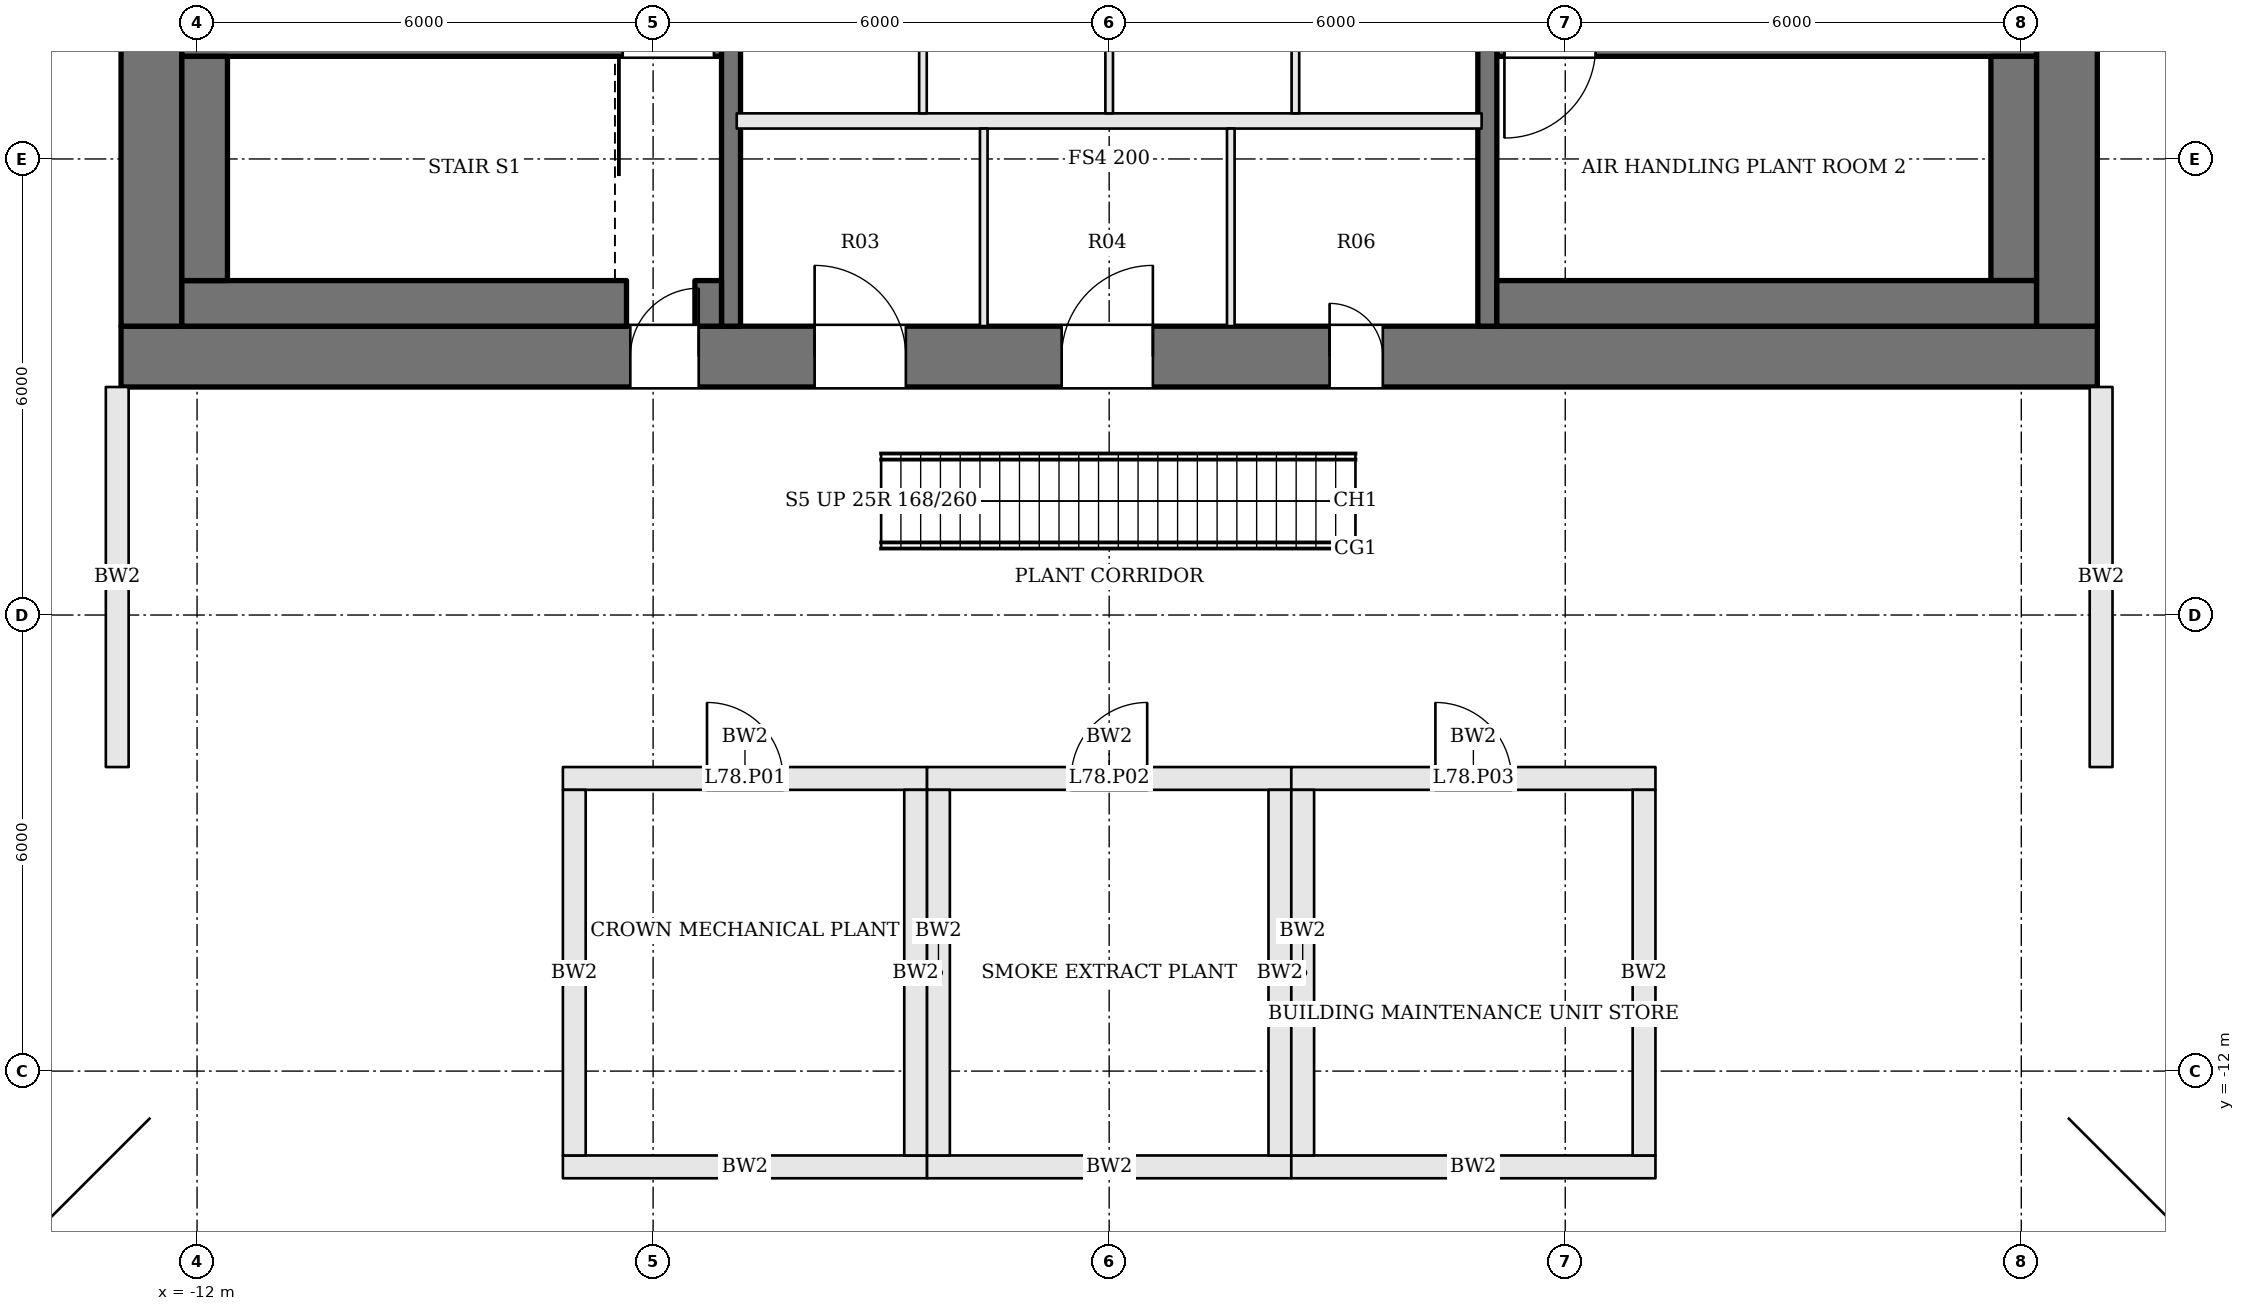
"""IFC4 building model, lengths in metres.
Left out: names, types, materials, properties, quantities, classifications, styles, units other than length and angle.
Written with IfcOpenShell. Run it as: python <this file> out.ifc"""

import sys

from ifc_helpers import new_model, si_unit, direction, frame, frame_2d, origin, place, context, subcontext, project, spatial, rectangle, extrude, element, fill, save


model = new_model("IFC4")
c1 = context("Model", 3, precision=1e-05, world=origin(), true_north=direction((0.0, 1.0)))
c2 = subcontext(c1, "Body", "Model", "MODEL_VIEW")
j1 = project(units=[si_unit("LENGTHUNIT", "METRE"), si_unit("PLANEANGLEUNIT", "RADIAN")], contexts=[c1])
p1 = place(None, origin())
s1 = spatial("IfcSite", under=j1, at=p1, CompositionType="ELEMENT")
p2 = place(p1, origin())
s2 = spatial("IfcBuilding", under=s1, at=p2, CompositionType="ELEMENT")
p3 = place(p2, frame((0.0, 0.0, 316.2)))
s3 = spatial("IfcBuildingStorey", under=s2, at=p3, CompositionType="ELEMENT", Elevation=316.2)
p4 = place(p3, frame((-13.0, -2.6, 0.0), z_axis=(0.0, 0.0, 1.0), x_axis=(1.0, 0.0, 0.0)))
e1 = element("IfcWall", 1, at=p4, inside=s3, PredefinedType="SHEAR", context=c2, shape_type="SweptSolid", body=[
    extrude(rectangle(XDim=26.0, YDim=0.8, at=frame_2d((13.0, 0.0))), origin(), (0.0, 0.0, 1.0), 4.0),
])
p5 = place(p4, frame((9.125, 0.0, 0.0)))
e2 = element("IfcOpeningElement", 2, at=p5, cuts=e1, PredefinedType="OPENING", context=c2, shape_type="SweptSolid", body=[
    extrude(rectangle(XDim=1.2, YDim=2.1, at=frame_2d((0.6, 1.05))), frame((0.0, 0.41, 0.0), z_axis=(0.0, -1.0, 0.0), x_axis=(1.0, 0.0, 0.0)), (0.0, 0.0, 1.0), 0.82),
])
p6 = place(p4, frame((12.375, 0.0, 0.0)))
e3 = element("IfcOpeningElement", 3, at=p6, cuts=e1, PredefinedType="OPENING", context=c2, shape_type="SweptSolid", body=[
    extrude(rectangle(XDim=1.2, YDim=2.1, at=frame_2d((0.6, 1.05))), frame((0.0, 0.41, 0.0), z_axis=(0.0, -1.0, 0.0), x_axis=(1.0, 0.0, 0.0)), (0.0, 0.0, 1.0), 0.82),
])
p7 = place(p4, frame((15.9, 0.0, 0.0)))
e4 = element("IfcOpeningElement", 4, at=p7, cuts=e1, PredefinedType="OPENING", context=c2, shape_type="SweptSolid", body=[
    extrude(rectangle(XDim=0.7, YDim=2.1, at=frame_2d((0.35, 1.05))), frame((0.0, 0.41, 0.0), z_axis=(0.0, -1.0, 0.0), x_axis=(1.0, 0.0, 0.0)), (0.0, 0.0, 1.0), 0.82),
])
p8 = place(p4, frame((6.7, 0.0, 0.0)))
e5 = element("IfcOpeningElement", 5, at=p8, cuts=e1, PredefinedType="OPENING", context=c2, shape_type="SweptSolid", body=[
    extrude(rectangle(XDim=0.9, YDim=2.1, at=frame_2d((0.45, 1.05))), frame((0.0, 0.41, 0.0), z_axis=(0.0, -1.0, 0.0), x_axis=(1.0, 0.0, 0.0)), (0.0, 0.0, 1.0), 0.82),
])
p9 = place(p3, frame((12.6, -2.2, 0.0), z_axis=(0.0, 0.0, 1.0), x_axis=(0.0, 1.0, 0.0)))
e6 = element("IfcWall", 6, at=p9, inside=s3, PredefinedType="SHEAR", context=c2, shape_type="SweptSolid", body=[
    extrude(rectangle(XDim=13.4, YDim=0.8, at=frame_2d((6.7, 0.0))), origin(), (0.0, 0.0, 1.0), 4.0),
])
p10 = place(p9, frame((7.4, 0.0, 0.0)))
e7 = element("IfcOpeningElement", 7, at=p10, cuts=e6, PredefinedType="OPENING", context=c2, shape_type="SweptSolid", body=[
    extrude(rectangle(XDim=1.8, YDim=2.1, at=frame_2d((0.9, 1.05))), frame((0.0, 0.41, 0.0), z_axis=(0.0, -1.0, 0.0), x_axis=(1.0, 0.0, 0.0)), (0.0, 0.0, 1.0), 0.82),
])
p11 = place(p3, frame((-12.6, -2.2, 0.0), z_axis=(0.0, 0.0, 1.0), x_axis=(0.0, 1.0, 0.0)))
e8 = element("IfcWall", 8, at=p11, inside=s3, PredefinedType="SHEAR", context=c2, shape_type="SweptSolid", body=[
    extrude(rectangle(XDim=13.4, YDim=0.8, at=frame_2d((6.7, 0.0))), origin(), (0.0, 0.0, 1.0), 4.0),
])
p12 = place(p11, frame((4.2, 0.0, 0.0)))
e9 = element("IfcOpeningElement", 9, at=p12, cuts=e8, PredefinedType="OPENING", context=c2, shape_type="SweptSolid", body=[
    extrude(rectangle(XDim=1.8, YDim=2.1, at=frame_2d((0.9, 1.05))), frame((0.0, 0.41, 0.0), z_axis=(0.0, -1.0, 0.0), x_axis=(1.0, 0.0, 0.0)), (0.0, 0.0, 1.0), 0.82),
])
p13 = place(p3, frame((-12.2, 1.475, 0.0), z_axis=(0.0, 0.0, 1.0), x_axis=(1.0, 0.0, 0.0)))
e10 = element("IfcWall", 10, at=p13, inside=s3, PredefinedType="SOLIDWALL", context=c2, shape_type="SweptSolid", body=[
    extrude(rectangle(XDim=7.1, YDim=0.25, at=frame_2d((3.55, 0.0))), origin(), (0.0, 0.0, 1.0), 3.28),
])
p14 = place(p13, frame((5.8, 0.0, 0.0)))
e11 = element("IfcOpeningElement", 11, at=p14, cuts=e10, PredefinedType="OPENING", context=c2, shape_type="SweptSolid", body=[
    extrude(rectangle(XDim=1.2, YDim=2.1, at=frame_2d((0.6, 1.05))), frame((0.0, 0.135, 0.0), z_axis=(0.0, -1.0, 0.0), x_axis=(1.0, 0.0, 0.0)), (0.0, 0.0, 1.0), 0.27),
])
p15 = place(p3, frame((12.2, 1.475, 0.0), z_axis=(0.0, 0.0, 1.0), x_axis=(-1.0, 0.0, 0.0)))
e12 = element("IfcWall", 12, at=p15, inside=s3, PredefinedType="SOLIDWALL", context=c2, shape_type="SweptSolid", body=[
    extrude(rectangle(XDim=7.1, YDim=0.25, at=frame_2d((3.55, 0.0))), origin(), (0.0, 0.0, 1.0), 3.28),
])
p16 = place(p15, frame((5.8, 0.0, 0.0)))
e13 = element("IfcOpeningElement", 13, at=p16, cuts=e12, PredefinedType="OPENING", context=c2, shape_type="SweptSolid", body=[
    extrude(rectangle(XDim=1.2, YDim=2.1, at=frame_2d((0.6, 1.05))), frame((0.0, 0.135, 0.0), z_axis=(0.0, -1.0, 0.0), x_axis=(1.0, 0.0, 0.0)), (0.0, 0.0, 1.0), 0.27),
])
p17 = place(p3, frame((-4.975, -2.2, 0.0), z_axis=(0.0, 0.0, 1.0), x_axis=(0.0, 1.0, 0.0)))
e14 = element("IfcWall", 14, at=p17, inside=s3, PredefinedType="SOLIDWALL", context=c2, shape_type="SweptSolid", body=[
    extrude(rectangle(XDim=13.4, YDim=0.25, at=frame_2d((6.7, 0.0))), origin(), (0.0, 0.0, 1.0), 3.28),
])
p18 = place(p17, frame((5.25, 0.0, 0.0)))
e15 = element("IfcOpeningElement", 15, at=p18, cuts=e14, PredefinedType="OPENING", context=c2, shape_type="SweptSolid", body=[
    extrude(rectangle(XDim=1.2, YDim=2.1, at=frame_2d((0.6, 1.05))), frame((0.0, 0.135, 0.0), z_axis=(0.0, -1.0, 0.0), x_axis=(1.0, 0.0, 0.0)), (0.0, 0.0, 1.0), 0.27),
])
p19 = place(p3, frame((4.975, 11.2, 0.0), z_axis=(0.0, 0.0, 1.0), x_axis=(0.0, -1.0, 0.0)))
e16 = element("IfcWall", 16, at=p19, inside=s3, PredefinedType="SOLIDWALL", context=c2, shape_type="SweptSolid", body=[
    extrude(rectangle(XDim=13.4, YDim=0.25, at=frame_2d((6.7, 0.0))), origin(), (0.0, 0.0, 1.0), 3.28),
])
p20 = place(p19, frame((5.25, 0.0, 0.0)))
e17 = element("IfcOpeningElement", 17, at=p20, cuts=e16, PredefinedType="OPENING", context=c2, shape_type="SweptSolid", body=[
    extrude(rectangle(XDim=1.2, YDim=2.1, at=frame_2d((0.6, 1.05))), frame((0.0, 0.135, 0.0), z_axis=(0.0, -1.0, 0.0), x_axis=(1.0, 0.0, 0.0)), (0.0, 0.0, 1.0), 0.27),
])
p21 = place(p3, frame((-12.2, -1.9, 0.0), z_axis=(0.0, 0.0, 1.0), x_axis=(1.0, 0.0, 0.0)))
e18 = element("IfcWall", 18, at=p21, inside=s3, PredefinedType="SOLIDWALL", context=c2, shape_type="SweptSolid", body=[
    extrude(rectangle(XDim=5.85, YDim=0.6, at=frame_2d((2.925, 0.0))), origin(), (0.0, 0.0, 1.0), 3.28),
])
p22 = place(p3, frame((-5.275, -2.2, 0.0), z_axis=(0.0, 0.0, 1.0), x_axis=(0.0, 1.0, 0.0)))
e19 = element("IfcWall", 19, at=p22, inside=s3, PredefinedType="SOLIDWALL", context=c2, shape_type="SweptSolid", body=[
    extrude(rectangle(XDim=0.6, YDim=0.35, at=frame_2d((0.3, 0.0))), origin(), (0.0, 0.0, 1.0), 3.28),
])
for number, where, z_axis, x_axis in (
    (20, (-11.9, -1.6, 0.0), (0.0, 0.0, 1.0), (0.0, 1.0, 0.0)),
    (21, (11.9, 1.35, 0.0), (0.0, 0.0, 1.0), (0.0, -1.0, 0.0)),
):
    element("IfcWall", number, at=place(p3, frame(where, z_axis=z_axis, x_axis=x_axis)), inside=s3, PredefinedType="SOLIDWALL", context=c2, shape_type="SweptSolid", body=[
        extrude(rectangle(XDim=2.95, YDim=0.6, at=frame_2d((1.475, 0.0))), origin(), (0.0, 0.0, 1.0), 3.28),
    ])
p23 = place(p3, frame((12.2, -1.9, 0.0), z_axis=(0.0, 0.0, 1.0), x_axis=(-1.0, 0.0, 0.0)))
e22 = element("IfcWall", 22, at=p23, inside=s3, PredefinedType="SOLIDWALL", context=c2, shape_type="SweptSolid", body=[
    extrude(rectangle(XDim=7.1, YDim=0.6, at=frame_2d((3.55, 0.0))), origin(), (0.0, 0.0, 1.0), 3.28),
])
p24 = place(p3, frame((-4.9, 0.5, 0.0), z_axis=(0.0, 0.0, 1.0), x_axis=(1.0, 0.0, 0.0)))
e23 = element("IfcWall", 23, at=p24, inside=s3, PredefinedType="SOLIDWALL", context=c2, shape_type="SweptSolid", body=[
    extrude(rectangle(XDim=9.8, YDim=0.2, at=frame_2d((4.9, 0.0))), origin(), (0.0, 0.0, 1.0), 3.28),
])
for number, where, z_axis, x_axis in (
    (24, (-2.45, 0.6, 0.0), (0.0, 0.0, 1.0), (0.0, 1.0, 0.0)),
    (25, (0.0, 0.6, 0.0), (0.0, 0.0, 1.0), (0.0, 1.0, 0.0)),
    (26, (2.45, 0.6, 0.0), (0.0, 0.0, 1.0), (0.0, 1.0, 0.0)),
):
    element("IfcWall", number, at=place(p3, frame(where, z_axis=z_axis, x_axis=x_axis)), inside=s3, PredefinedType="PARTITIONING", context=c2, shape_type="SweptSolid", body=[
        extrude(rectangle(XDim=2.2, YDim=0.1, at=frame_2d((1.1, 0.0))), origin(), (0.0, 0.0, 1.0), 3.28),
    ])
for number, where, z_axis, x_axis in (
    (27, (-1.65, -2.2, 0.0), (0.0, 0.0, 1.0), (0.0, 1.0, 0.0)),
    (28, (1.6, -2.2, 0.0), (0.0, 0.0, 1.0), (0.0, 1.0, 0.0)),
):
    element("IfcWall", number, at=place(p3, frame(where, z_axis=z_axis, x_axis=x_axis)), inside=s3, PredefinedType="PARTITIONING", context=c2, shape_type="SweptSolid", body=[
        extrude(rectangle(XDim=2.6, YDim=0.1, at=frame_2d((1.3, 0.0))), origin(), (0.0, 0.0, 1.0), 3.28),
    ])
p25 = place(p3, frame((-7.187, -8.15, 0.0), z_axis=(0.0, 0.0, 1.0), x_axis=(1.0, 0.0, 0.0)))
e29 = element("IfcWall", 29, at=p25, inside=s3, PredefinedType="SOLIDWALL", context=c2, shape_type="SweptSolid", body=[
    extrude(rectangle(XDim=4.791, YDim=0.3, at=frame_2d((2.396, 0.0))), origin(), (0.0, 0.0, 1.0), 3.484),
])
p26 = place(p25, frame((1.896, 0.0, 0.0)))
e30 = element("IfcOpeningElement", 30, at=p26, cuts=e29, PredefinedType="OPENING", context=c2, shape_type="SweptSolid", body=[
    extrude(rectangle(XDim=1.0, YDim=2.1, at=frame_2d((0.5, 1.05))), frame((0.0, 0.16, 0.0), z_axis=(0.0, -1.0, 0.0), x_axis=(1.0, 0.0, 0.0)), (0.0, 0.0, 1.0), 0.32),
])
p27 = place(p3, frame((-7.187, -13.26, 0.0), z_axis=(0.0, 0.0, 1.0), x_axis=(1.0, 0.0, 0.0)))
e31 = element("IfcWall", 31, at=p27, inside=s3, PredefinedType="SOLIDWALL", context=c2, shape_type="SweptSolid", body=[
    extrude(rectangle(XDim=4.791, YDim=0.3, at=frame_2d((2.396, 0.0))), origin(), (0.0, 0.0, 1.0), 3.484),
])
for number, where, z_axis, x_axis in (
    (32, (-7.037, -13.11, 0.0), (0.0, 0.0, 1.0), (0.0, 1.0, 0.0)),
    (33, (-2.546, -13.11, 0.0), (0.0, 0.0, 1.0), (0.0, 1.0, 0.0)),
):
    element("IfcWall", number, at=place(p3, frame(where, z_axis=z_axis, x_axis=x_axis)), inside=s3, PredefinedType="SOLIDWALL", context=c2, shape_type="SweptSolid", body=[
        extrude(rectangle(XDim=4.81, YDim=0.3, at=frame_2d((2.405, 0.0))), origin(), (0.0, 0.0, 1.0), 3.484),
    ])
p28 = place(p3, frame((-2.396, -8.15, 0.0), z_axis=(0.0, 0.0, 1.0), x_axis=(1.0, 0.0, 0.0)))
e34 = element("IfcWall", 34, at=p28, inside=s3, PredefinedType="SOLIDWALL", context=c2, shape_type="SweptSolid", body=[
    extrude(rectangle(XDim=4.792, YDim=0.3, at=frame_2d((2.396, 0.0))), origin(), (0.0, 0.0, 1.0), 3.484),
])
p29 = place(p28, frame((1.896, 0.0, 0.0)))
e35 = element("IfcOpeningElement", 35, at=p29, cuts=e34, PredefinedType="OPENING", context=c2, shape_type="SweptSolid", body=[
    extrude(rectangle(XDim=1.0, YDim=2.1, at=frame_2d((0.5, 1.05))), frame((0.0, 0.16, 0.0), z_axis=(0.0, -1.0, 0.0), x_axis=(1.0, 0.0, 0.0)), (0.0, 0.0, 1.0), 0.32),
])
p30 = place(p3, frame((-2.396, -13.26, 0.0), z_axis=(0.0, 0.0, 1.0), x_axis=(1.0, 0.0, 0.0)))
e36 = element("IfcWall", 36, at=p30, inside=s3, PredefinedType="SOLIDWALL", context=c2, shape_type="SweptSolid", body=[
    extrude(rectangle(XDim=4.792, YDim=0.3, at=frame_2d((2.396, 0.0))), origin(), (0.0, 0.0, 1.0), 3.484),
])
for number, where, z_axis, x_axis in (
    (37, (-2.246, -13.11, 0.0), (0.0, 0.0, 1.0), (0.0, 1.0, 0.0)),
    (38, (2.246, -13.11, 0.0), (0.0, 0.0, 1.0), (0.0, 1.0, 0.0)),
):
    element("IfcWall", number, at=place(p3, frame(where, z_axis=z_axis, x_axis=x_axis)), inside=s3, PredefinedType="SOLIDWALL", context=c2, shape_type="SweptSolid", body=[
        extrude(rectangle(XDim=4.81, YDim=0.3, at=frame_2d((2.405, 0.0))), origin(), (0.0, 0.0, 1.0), 3.484),
    ])
p31 = place(p3, frame((2.396, -8.15, 0.0), z_axis=(0.0, 0.0, 1.0), x_axis=(1.0, 0.0, 0.0)))
e39 = element("IfcWall", 39, at=p31, inside=s3, PredefinedType="SOLIDWALL", context=c2, shape_type="SweptSolid", body=[
    extrude(rectangle(XDim=4.791, YDim=0.3, at=frame_2d((2.396, 0.0))), origin(), (0.0, 0.0, 1.0), 3.484),
])
p32 = place(p31, frame((1.896, 0.0, 0.0)))
e40 = element("IfcOpeningElement", 40, at=p32, cuts=e39, PredefinedType="OPENING", context=c2, shape_type="SweptSolid", body=[
    extrude(rectangle(XDim=1.0, YDim=2.1, at=frame_2d((0.5, 1.05))), frame((0.0, 0.16, 0.0), z_axis=(0.0, -1.0, 0.0), x_axis=(1.0, 0.0, 0.0)), (0.0, 0.0, 1.0), 0.32),
])
p33 = place(p3, frame((2.396, -13.26, 0.0), z_axis=(0.0, 0.0, 1.0), x_axis=(1.0, 0.0, 0.0)))
e41 = element("IfcWall", 41, at=p33, inside=s3, PredefinedType="SOLIDWALL", context=c2, shape_type="SweptSolid", body=[
    extrude(rectangle(XDim=4.791, YDim=0.3, at=frame_2d((2.396, 0.0))), origin(), (0.0, 0.0, 1.0), 3.484),
])
for number, where, z_axis, x_axis in (
    (42, (2.546, -13.11, 0.0), (0.0, 0.0, 1.0), (0.0, 1.0, 0.0)),
    (43, (7.037, -13.11, 0.0), (0.0, 0.0, 1.0), (0.0, 1.0, 0.0)),
):
    element("IfcWall", number, at=place(p3, frame(where, z_axis=z_axis, x_axis=x_axis)), inside=s3, PredefinedType="SOLIDWALL", context=c2, shape_type="SweptSolid", body=[
        extrude(rectangle(XDim=4.81, YDim=0.3, at=frame_2d((2.405, 0.0))), origin(), (0.0, 0.0, 1.0), 3.484),
    ])
for number, where, z_axis, x_axis in (
    (44, (-13.05, -8.0, 0.0), (0.0, 0.0, 1.0), (0.0, 1.0, 0.0)),
    (45, (13.05, -8.0, 0.0), (0.0, 0.0, 1.0), (0.0, 1.0, 0.0)),
):
    element("IfcWall", number, at=place(p3, frame(where, z_axis=z_axis, x_axis=x_axis)), inside=s3, PredefinedType="SOLIDWALL", context=c2, shape_type="SweptSolid", body=[
        extrude(rectangle(XDim=5.0, YDim=0.3, at=frame_2d((2.5, 0.0))), origin(), (0.0, 0.0, 1.0), 3.484),
    ])
p34 = place(p5, origin())
e46 = element("IfcDoor", 46, at=p34, inside=s3, OperationType="SINGLE_SWING_LEFT", PredefinedType="DOOR", context=c2, shape_type="SweptSolid", body=[
    extrude(rectangle(XDim=1.2, YDim=2.1, at=frame_2d((0.6, 1.05))), frame((0.0, 0.025, 0.0), z_axis=(0.0, -1.0, 0.0), x_axis=(1.0, 0.0, 0.0)), (0.0, 0.0, 1.0), 0.05),
])
fill(e2, e46)
p35 = place(p6, origin())
e47 = element("IfcDoor", 47, at=p35, inside=s3, OperationType="SINGLE_SWING_RIGHT", PredefinedType="DOOR", context=c2, shape_type="SweptSolid", body=[
    extrude(rectangle(XDim=1.2, YDim=2.1, at=frame_2d((0.6, 1.05))), frame((0.0, 0.025, 0.0), z_axis=(0.0, -1.0, 0.0), x_axis=(1.0, 0.0, 0.0)), (0.0, 0.0, 1.0), 0.05),
])
fill(e3, e47)
p36 = place(p7, origin())
e48 = element("IfcDoor", 48, at=p36, inside=s3, OperationType="SINGLE_SWING_LEFT", PredefinedType="DOOR", context=c2, shape_type="SweptSolid", body=[
    extrude(rectangle(XDim=0.7, YDim=2.1, at=frame_2d((0.35, 1.05))), frame((0.0, 0.025, 0.0), z_axis=(0.0, -1.0, 0.0), x_axis=(1.0, 0.0, 0.0)), (0.0, 0.0, 1.0), 0.05),
])
fill(e4, e48)
p37 = place(p26, origin())
e49 = element("IfcDoor", 49, at=p37, inside=s3, OperationType="SINGLE_SWING_LEFT", PredefinedType="DOOR", context=c2, shape_type="SweptSolid", body=[
    extrude(rectangle(XDim=1.0, YDim=2.1, at=frame_2d((0.5, 1.05))), frame((0.0, 0.025, 0.0), z_axis=(0.0, -1.0, 0.0), x_axis=(1.0, 0.0, 0.0)), (0.0, 0.0, 1.0), 0.05),
])
fill(e30, e49)
p38 = place(p29, origin())
e50 = element("IfcDoor", 50, at=p38, inside=s3, OperationType="SINGLE_SWING_RIGHT", PredefinedType="DOOR", context=c2, shape_type="SweptSolid", body=[
    extrude(rectangle(XDim=1.0, YDim=2.1, at=frame_2d((0.5, 1.05))), frame((0.0, 0.025, 0.0), z_axis=(0.0, -1.0, 0.0), x_axis=(1.0, 0.0, 0.0)), (0.0, 0.0, 1.0), 0.05),
])
fill(e35, e50)
p39 = place(p32, origin())
e51 = element("IfcDoor", 51, at=p39, inside=s3, OperationType="SINGLE_SWING_LEFT", PredefinedType="DOOR", context=c2, shape_type="SweptSolid", body=[
    extrude(rectangle(XDim=1.0, YDim=2.1, at=frame_2d((0.5, 1.05))), frame((0.0, 0.025, 0.0), z_axis=(0.0, -1.0, 0.0), x_axis=(1.0, 0.0, 0.0)), (0.0, 0.0, 1.0), 0.05),
])
fill(e40, e51)
p40 = place(p8, origin())
e52 = element("IfcDoor", 52, at=p40, inside=s3, OperationType="SINGLE_SWING_RIGHT", PredefinedType="DOOR", context=c2, shape_type="SweptSolid", body=[
    extrude(rectangle(XDim=0.9, YDim=2.1, at=frame_2d((0.45, 1.05))), frame((0.0, 0.025, 0.0), z_axis=(0.0, -1.0, 0.0), x_axis=(1.0, 0.0, 0.0)), (0.0, 0.0, 1.0), 0.05),
])
fill(e5, e52)
save(model, sys.argv[1])
